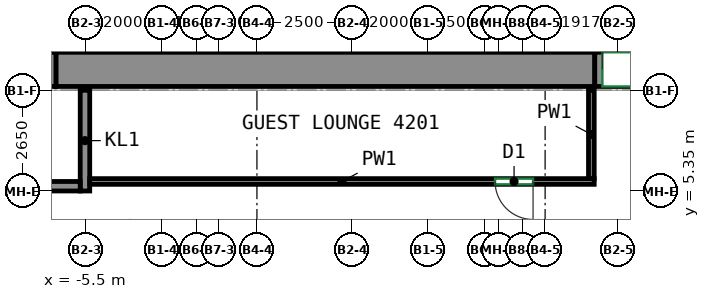
"""IFC4 building model, lengths in metres.
Left out: names, types, materials, properties, quantities, classifications, styles, units other than length and angle.
Written with IfcOpenShell. Run it as: python <this file> out.ifc"""

import sys

from ifc_helpers import new_model, si_unit, direction, frame, frame_2d, origin, place, context, subcontext, project, spatial, rectangle, extrude, source, transform, mapped, element, fill, save


model = new_model("IFC4")
c1 = context("Model", 3, precision=1e-05, world=origin(), true_north=direction((0.0, 1.0)))
c2 = subcontext(c1, "Body", "Model", "MODEL_VIEW")
j1 = project(units=[si_unit("LENGTHUNIT", "METRE"), si_unit("PLANEANGLEUNIT", "RADIAN")], contexts=[c1])
p1 = place(None, origin())
s1 = spatial("IfcSite", under=j1, at=p1, CompositionType="ELEMENT")
p2 = place(p1, origin())
s2 = spatial("IfcBuilding", under=s1, at=p2, CompositionType="ELEMENT")
p3 = place(p2, frame((0.0, 0.0, 178.7)))
s3 = spatial("IfcBuildingStorey", under=s2, at=p3, CompositionType="ELEMENT", Elevation=178.7)
m1 = source(origin(), c2, "Body", "SweptSolid", [
    extrude(rectangle(XDim=14.18, YDim=0.9, at=frame_2d((7.09, 0.0))), origin(), (0.0, 0.0, 1.0), 3.12),
])
p4 = place(p3, frame((-6.29, 8.55, 0.0), z_axis=(0.0, 0.0, 1.0), x_axis=(1.0, 0.0, 0.0)))
e1 = element("IfcWall", 1, at=p4, inside=s3, PredefinedType="SHEAR", context=c2, shape_type="MappedRepresentation", body=[
    mapped(m1, transform((0.0, 0.0, 0.0))),
])
m2 = source(origin(), c2, "Body", "SweptSolid", [
    extrude(rectangle(XDim=2.65, YDim=0.25, at=frame_2d((1.325, 0.0))), origin(), (0.0, 0.0, 1.0), 3.12),
])
p5 = place(p3, frame((-5.525, 5.35, 0.0), z_axis=(0.0, 0.0, 1.0), x_axis=(0.0, 1.0, 0.0)))
e2 = element("IfcWall", 2, at=p5, inside=s3, PredefinedType="PARTITIONING", context=c2, shape_type="MappedRepresentation", body=[
    mapped(m2, transform((0.0, 0.0, 0.0))),
])
m3 = source(origin(), c2, "Body", "SweptSolid", [
    extrude(rectangle(XDim=5.36, YDim=0.25, at=frame_2d((2.68, 0.0))), origin(), (0.0, 0.0, 1.0), 3.12),
])
p6 = place(p3, frame((-11.01, 5.475, 0.0), z_axis=(0.0, 0.0, 1.0), x_axis=(1.0, 0.0, 0.0)))
e3 = element("IfcWall", 3, at=p6, inside=s3, PredefinedType="PARTITIONING", context=c2, shape_type="MappedRepresentation", body=[
    mapped(m3, transform((0.0, 0.0, 0.0))),
])
p7 = place(p6, frame((2.28, 0.0, 0.0)))
e4 = element("IfcOpeningElement", 4, at=p7, cuts=e3, PredefinedType="OPENING", context=c2, shape_type="SweptSolid", body=[
    extrude(rectangle(XDim=0.8, YDim=2.0, at=frame_2d((0.4, 1.0))), frame((0.0, 0.135, 0.0), z_axis=(0.0, -1.0, 0.0), x_axis=(1.0, 0.0, 0.0)), (0.0, 0.0, 1.0), 0.27),
])
m4 = source(origin(), c2, "Body", "SweptSolid", [
    extrude(rectangle(XDim=1.4, YDim=0.9, at=frame_2d((0.7, 0.0))), origin(), (0.0, 0.0, 1.0), 2.7),
])
p8 = place(p3, frame((-7.69, 8.55, 0.0), z_axis=(0.0, 0.0, 1.0), x_axis=(1.0, 0.0, 0.0)))
e5 = element("IfcWall", 5, at=p8, inside=s3, PredefinedType="PARTITIONING", context=c2, shape_type="MappedRepresentation", body=[
    mapped(m4, transform((0.0, 0.0, 0.0))),
])
p9 = place(p8, frame((0.25, 0.0, 0.0)))
e6 = element("IfcOpeningElement", 6, at=p9, cuts=e5, PredefinedType="OPENING", context=c2, shape_type="SweptSolid", body=[
    extrude(rectangle(XDim=0.9, YDim=2.1, at=frame_2d((0.45, 1.05))), frame((0.0, 0.46, 0.0), z_axis=(0.0, -1.0, 0.0), x_axis=(1.0, 0.0, 0.0)), (0.0, 0.0, 1.0), 0.92),
])
m5 = source(origin(), c2, "Body", "SweptSolid", [
    extrude(rectangle(XDim=2.4, YDim=0.9, at=frame_2d((1.2, 0.0))), origin(), (0.0, 0.0, 1.0), 2.7),
])
p10 = place(p3, frame((7.89, 8.55, 0.0), z_axis=(0.0, 0.0, 1.0), x_axis=(1.0, 0.0, 0.0)))
e7 = element("IfcWall", 7, at=p10, inside=s3, PredefinedType="PARTITIONING", context=c2, shape_type="MappedRepresentation", body=[
    mapped(m5, transform((0.0, 0.0, 0.0))),
])
p11 = place(p10, frame((0.2, 0.0, 0.0)))
e8 = element("IfcOpeningElement", 8, at=p11, cuts=e7, PredefinedType="OPENING", context=c2, shape_type="SweptSolid", body=[
    extrude(rectangle(XDim=2.0, YDim=2.1, at=frame_2d((1.0, 1.05))), frame((0.0, 0.46, 0.0), z_axis=(0.0, -1.0, 0.0), x_axis=(1.0, 0.0, 0.0)), (0.0, 0.0, 1.0), 0.92),
])
p12 = place(p3, frame((7.875, 5.6, 0.0), z_axis=(0.0, 0.0, 1.0), x_axis=(-1.0, 0.0, 0.0)))
e9 = element("IfcWall", 9, at=p12, inside=s3, PredefinedType="PARTITIONING", context=c2, shape_type="SweptSolid", body=[
    extrude(rectangle(XDim=13.275, YDim=0.15, at=frame_2d((6.637, 0.0))), origin(), (0.0, 0.0, 1.0), 3.12),
])
p13 = place(p12, frame((1.609, 0.0, 0.0)))
e10 = element("IfcOpeningElement", 10, at=p13, cuts=e9, PredefinedType="OPENING", context=c2, shape_type="SweptSolid", body=[
    extrude(rectangle(XDim=1.0, YDim=2.1, at=frame_2d((0.5, 1.05))), frame((0.0, 0.085, 0.0), z_axis=(0.0, -1.0, 0.0), x_axis=(1.0, 0.0, 0.0)), (0.0, 0.0, 1.0), 0.17),
])
p14 = place(p3, frame((7.8, 8.0, 0.0), z_axis=(0.0, 0.0, 1.0), x_axis=(0.0, -1.0, 0.0)))
e11 = element("IfcWall", 11, at=p14, inside=s3, PredefinedType="PARTITIONING", context=c2, shape_type="SweptSolid", body=[
    extrude(rectangle(XDim=2.325, YDim=0.15, at=frame_2d((1.163, 0.0))), origin(), (0.0, 0.0, 1.0), 3.12),
])
p15 = place(p11, origin())
e12 = element("IfcDoor", 12, at=p15, inside=s3, OperationType="DOUBLE_DOOR_SINGLE_SWING", PredefinedType="DOOR", context=c2, shape_type="SweptSolid", body=[
    extrude(rectangle(XDim=2.0, YDim=2.1, at=frame_2d((1.0, 1.05))), frame((0.0, 0.355, 0.0), z_axis=(0.0, -1.0, 0.0), x_axis=(1.0, 0.0, 0.0)), (0.0, 0.0, 1.0), 0.05),
])
fill(e8, e12)
p16 = place(p13, origin())
e13 = element("IfcDoor", 13, at=p16, inside=s3, OperationType="SINGLE_SWING_LEFT", PredefinedType="DOOR", context=c2, shape_type="SweptSolid", body=[
    extrude(rectangle(XDim=1.0, YDim=2.1, at=frame_2d((0.5, 1.05))), frame((0.0, 0.025, 0.0), z_axis=(0.0, -1.0, 0.0), x_axis=(1.0, 0.0, 0.0)), (0.0, 0.0, 1.0), 0.05),
])
fill(e10, e13)
save(model, sys.argv[1])
